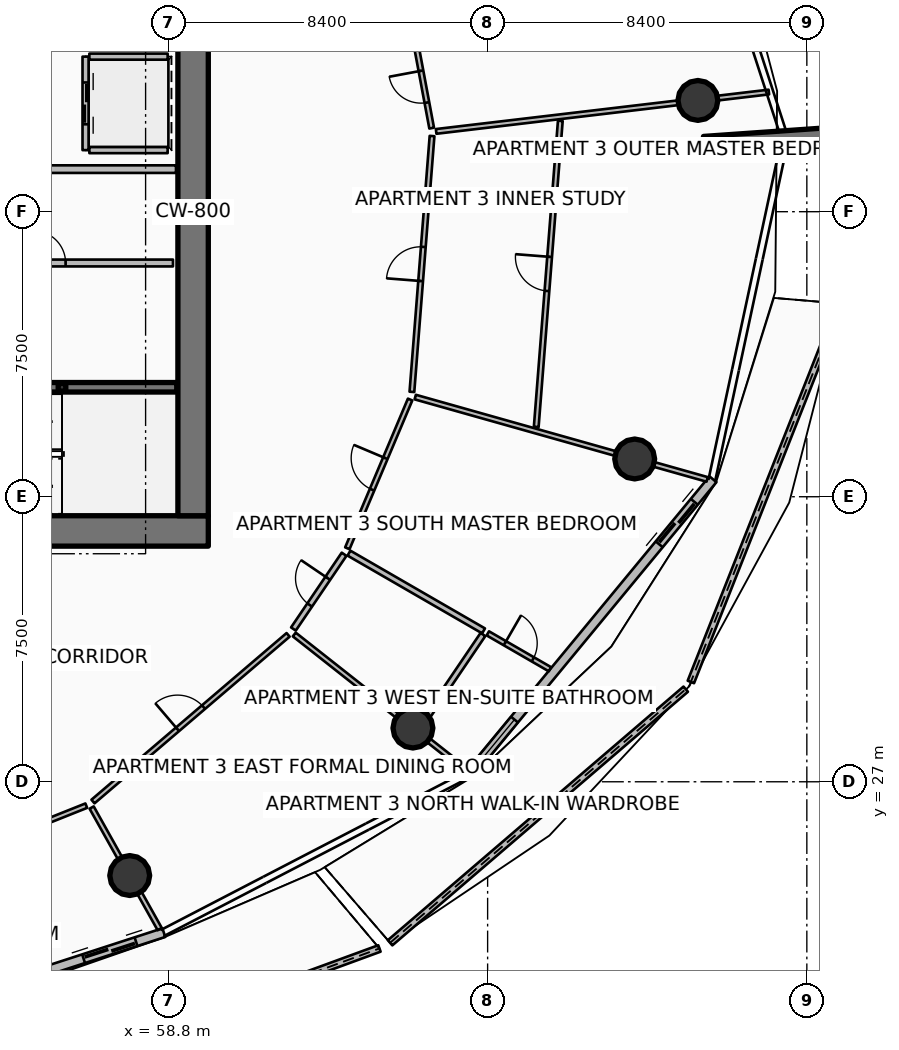
"""IFC4 building model, lengths in metres.
Left out: names, types, materials, properties, quantities, classifications, styles, units other than length and angle.
Written with IfcOpenShell. Run it as: python <this file> out.ifc"""

import sys

from ifc_helpers import new_model, si_unit, direction, frame, frame_2d, origin, origin_2d, place, context, subcontext, project, spatial, polyline, rectangle, hollow_rectangle, circle, outline, extrude, element, fill, save


model = new_model("IFC4")
c1 = context("Model", 3, precision=1e-05, world=origin(), true_north=direction((0.0, 1.0)))
c2 = subcontext(c1, "Body", "Model", "MODEL_VIEW")
j1 = project(units=[si_unit("LENGTHUNIT", "METRE"), si_unit("PLANEANGLEUNIT", "RADIAN")], contexts=[c1])
p1 = place(None, origin())
s1 = spatial("IfcSite", under=j1, at=p1, CompositionType="ELEMENT")
p2 = place(p1, origin())
s2 = spatial("IfcBuilding", under=s1, at=p2, CompositionType="ELEMENT")
p3 = place(p2, frame((0.0, 0.0, 161.55)))
s3 = spatial("IfcBuildingStorey", under=s2, at=p3, CompositionType="ELEMENT", Elevation=161.55)
p4 = place(p3, frame((49.95, 33.6, 0.0), z_axis=(0.0, 0.0, 1.0), x_axis=(1.0, 0.0, 0.0)))
e1 = element("IfcWall", 1, at=p4, inside=s3, PredefinedType="SHEAR", context=c2, shape_type="SweptSolid", body=[
    extrude(rectangle(XDim=9.9, YDim=0.8, at=frame_2d((4.95, 0.0))), origin(), (0.0, 0.0, 1.0), 3.75),
])
p5 = place(p3, frame((59.45, 34.0, 0.0), z_axis=(0.0, 0.0, 1.0), x_axis=(0.0, 1.0, 0.0)))
e2 = element("IfcWall", 2, at=p5, inside=s3, PredefinedType="SHEAR", context=c2, shape_type="SweptSolid", body=[
    extrude(rectangle(XDim=16.0, YDim=0.8, at=frame_2d((8.0, 0.0))), origin(), (0.0, 0.0, 1.0), 3.75),
])
p6 = place(p3, frame((56.0, 37.38, 0.0), z_axis=(0.0, 0.0, 1.0), x_axis=(1.0, 0.0, 0.0)))
e3 = element("IfcColumn", 3, at=p6, inside=s3, PredefinedType="COLUMN", context=c2, shape_type="SweptSolid", body=[
    extrude(hollow_rectangle(XDim=0.2, YDim=0.2, WallThickness=0.01, InnerFilletRadius=0.01, OuterFilletRadius=0.02, at=origin_2d()), origin(), (0.0, 0.0, 1.0), 1.67),
])
p7 = place(p3, frame((72.897, 43.741, 0.0), z_axis=(0.0, 0.0, 1.0), x_axis=(0.997564163539, 0.069754853754, 0.0)))
e4 = element("IfcWall", 4, at=p7, inside=s3, PredefinedType="SOLIDWALL", context=c2, shape_type="SweptSolid", body=[
    extrude(rectangle(XDim=3.5, YDim=0.48, at=frame_2d((1.75, 0.0))), origin(), (0.0, 0.0, 1.0), 3.75),
])
for number, where, z_axis, x_axis in (
    (5, (57.782, 24.533, 0.0), (0.0, 0.0, 1.0), (1.0, 0.0, 0.0)),
    (6, (65.234, 28.414, 0.0), (0.0, 0.0, 1.0), (1.0, 0.0, 0.0)),
    (7, (71.07, 35.494, 0.0), (0.0, 0.0, 1.0), (1.0, 0.0, 0.0)),
    (8, (72.733, 44.927, 0.0), (0.0, 0.0, 1.0), (1.0, 0.0, 0.0)),
):
    element("IfcColumn", number, at=place(p3, frame(where, z_axis=z_axis, x_axis=x_axis)), inside=s3, PredefinedType="COLUMN", context=c2, shape_type="SweptSolid", body=[
        extrude(circle(Radius=0.525, at=origin_2d()), origin(), (0.0, 0.0, 1.0), 3.5),
    ])
p8 = place(p3, frame((55.482, 19.362, 0.0), z_axis=(0.0, 0.0, 1.0), x_axis=(0.93889246029, 0.344210615774, 0.0)))
e9 = element("IfcWall", 9, at=p8, inside=s3, PredefinedType="PARAPET", context=c2, shape_type="SweptSolid", body=[
    extrude(outline(polyline([(0.0, 0.0), (9.449, 0.0), (9.449, 1.86), (4.725, 1.798), (0.0, 1.632), (0.0, 0.0)])), frame((0.0, 0.09, 0.0), z_axis=(0.0, -1.0, 0.0), x_axis=(1.0, 0.0, 0.0)), (0.0, 0.0, 1.0), 0.18),
])
p9 = place(p3, frame((64.634, 22.763, 0.0), z_axis=(0.0, 0.0, 1.0), x_axis=(0.758999279374, 0.651091463551, 0.0)))
e10 = element("IfcWall", 10, at=p9, inside=s3, PredefinedType="PARAPET", context=c2, shape_type="SweptSolid", body=[
    extrude(outline(polyline([(0.0, 0.0), (10.249, 0.0), (10.249, 1.632), (5.125, 1.798), (0.0, 1.86), (0.0, 0.0)])), frame((0.0, 0.09, 0.0), z_axis=(0.0, -1.0, 0.0), x_axis=(1.0, 0.0, 0.0)), (0.0, 0.0, 1.0), 0.18),
])
p10 = place(p3, frame((72.548, 29.626, 0.0), z_axis=(0.0, 0.0, 1.0), x_axis=(0.367668520181, 0.929956912587, 0.0)))
e11 = element("IfcWall", 11, at=p10, inside=s3, PredefinedType="PARAPET", context=c2, shape_type="SweptSolid", body=[
    extrude(outline(polyline([(0.0, 0.0), (10.707, 0.0), (10.707, 1.233), (5.354, 1.418), (0.0, 1.632), (0.0, 0.0)])), frame((0.0, 0.09, 0.0), z_axis=(0.0, -1.0, 0.0), x_axis=(1.0, 0.0, 0.0)), (0.0, 0.0, 1.0), 0.18),
])
p11 = place(p3, frame((50.51, 20.376, 0.0), z_axis=(0.0, 0.0, 1.0), x_axis=(0.951046390632, 0.309048156224, 0.0)))
e12 = element("IfcWall", 12, at=p11, inside=s3, PredefinedType="SOLIDWALL", context=c2, shape_type="SweptSolid", body=[
    extrude(rectangle(XDim=8.59, YDim=0.24, at=frame_2d((4.295, 0.0))), origin(), (0.0, 0.0, 1.0), 2.45),
])
p12 = place(p11, frame((6.37, 0.0, 0.0)))
e13 = element("IfcOpeningElement", 13, at=p12, cuts=e12, PredefinedType="OPENING", context=c2, shape_type="SweptSolid", body=[
    extrude(rectangle(XDim=1.45, YDim=2.15, at=frame_2d((0.725, 1.075))), frame((0.0, 0.13, 0.0), z_axis=(0.0, -1.0, 0.0), x_axis=(1.0, 0.0, 0.0)), (0.0, 0.0, 1.0), 0.26),
])
p13 = place(p11, frame((0.28, 0.0, 0.65)))
e14 = element("IfcOpeningElement", 14, at=p13, cuts=e12, PredefinedType="OPENING", context=c2, shape_type="SweptSolid", body=[
    extrude(rectangle(XDim=1.6, YDim=1.5, at=frame_2d((0.8, 0.75))), frame((0.0, 0.13, 0.0), z_axis=(0.0, -1.0, 0.0), x_axis=(1.0, 0.0, 0.0)), (0.0, 0.0, 1.0), 0.26),
])
p14 = place(p3, frame((66.709, 27.187, 0.0), z_axis=(0.0, 0.0, 1.0), x_axis=(0.636771922292, 0.77105221547, 0.0)))
e15 = element("IfcWall", 15, at=p14, inside=s3, PredefinedType="SOLIDWALL", context=c2, shape_type="SweptSolid", body=[
    extrude(rectangle(XDim=10.082, YDim=0.24, at=frame_2d((5.041, 0.0))), origin(), (0.0, 0.0, 1.0), 2.45),
])
p15 = place(p14, frame((7.862, 0.0, 0.0)))
e16 = element("IfcOpeningElement", 16, at=p15, cuts=e15, PredefinedType="OPENING", context=c2, shape_type="SweptSolid", body=[
    extrude(rectangle(XDim=1.45, YDim=2.15, at=frame_2d((0.725, 1.075))), frame((0.0, 0.13, 0.0), z_axis=(0.0, -1.0, 0.0), x_axis=(1.0, 0.0, 0.0)), (0.0, 0.0, 1.0), 0.26),
])
p16 = place(p14, frame((0.28, 0.0, 0.65)))
e17 = element("IfcOpeningElement", 17, at=p16, cuts=e15, PredefinedType="OPENING", context=c2, shape_type="SweptSolid", body=[
    extrude(rectangle(XDim=1.6, YDim=1.5, at=frame_2d((0.8, 0.75))), frame((0.0, 0.13, 0.0), z_axis=(0.0, -1.0, 0.0), x_axis=(1.0, 0.0, 0.0)), (0.0, 0.0, 1.0), 0.26),
])
p17 = place(p3, frame((51.48, 37.38, 0.0), z_axis=(0.0, 0.0, 1.0), x_axis=(1.0, 0.0, 0.0)))
e18 = element("IfcWall", 18, at=p17, inside=s3, PredefinedType="SOLIDWALL", context=c2, shape_type="SweptSolid", body=[
    extrude(rectangle(XDim=7.54, YDim=0.25, at=frame_2d((3.77, 0.0))), origin(), (0.0, 0.0, 1.0), 3.5),
])
p18 = place(p17, frame((0.3, 0.0, 0.0)))
e19 = element("IfcOpeningElement", 19, at=p18, cuts=e18, PredefinedType="OPENING", context=c2, shape_type="SweptSolid", body=[
    extrude(rectangle(XDim=1.55, YDim=2.15, at=frame_2d((0.775, 1.075))), frame((0.0, 0.135, 0.0), z_axis=(0.0, -1.0, 0.0), x_axis=(1.0, 0.0, 0.0)), (0.0, 0.0, 1.0), 0.27),
])
p19 = place(p3, frame((56.62, 46.08, 0.0), z_axis=(0.0, 0.0, 1.0), x_axis=(0.0, -1.0, 0.0)))
e20 = element("IfcWall", 20, at=p19, inside=s3, PredefinedType="PARTITIONING", context=c2, shape_type="SweptSolid", body=[
    extrude(rectangle(XDim=2.46, YDim=0.16, at=frame_2d((1.23, 0.0))), origin(), (0.0, 0.0, 1.0), 3.5),
])
p20 = place(p19, frame((0.68, 0.0, 0.0)))
e21 = element("IfcOpeningElement", 21, at=p20, cuts=e20, PredefinedType="OPENING", context=c2, shape_type="SweptSolid", body=[
    extrude(rectangle(XDim=1.1, YDim=2.1, at=frame_2d((0.55, 1.05))), frame((0.0, 0.09, 0.0), z_axis=(0.0, -1.0, 0.0), x_axis=(1.0, 0.0, 0.0)), (0.0, 0.0, 1.0), 0.18),
])
for number, where, z_axis, x_axis in (
    (22, (56.72, 46.08, 0.0), (0.0, 0.0, 1.0), (1.0, 0.0, 0.0)),
    (23, (56.72, 43.62, 0.0), (0.0, 0.0, 1.0), (1.0, 0.0, 0.0)),
):
    element("IfcWall", number, at=place(p3, frame(where, z_axis=z_axis, x_axis=x_axis)), inside=s3, PredefinedType="PARTITIONING", context=c2, shape_type="SweptSolid", body=[
        extrude(rectangle(XDim=2.06, YDim=0.16, at=frame_2d((1.03, 0.0))), origin(), (0.0, 0.0, 1.0), 3.5),
    ])
p21 = place(p3, frame((52.42, 40.65, 0.0), z_axis=(0.0, 0.0, 1.0), x_axis=(1.0, 0.0, 0.0)))
e24 = element("IfcWall", 24, at=p21, inside=s3, PredefinedType="PARTITIONING", context=c2, shape_type="SweptSolid", body=[
    extrude(rectangle(XDim=6.5, YDim=0.18, at=frame_2d((3.25, 0.0))), origin(), (0.0, 0.0, 1.0), 3.5),
])
p22 = place(p21, frame((2.825, 0.0, 0.0)))
e25 = element("IfcOpeningElement", 25, at=p22, cuts=e24, PredefinedType="OPENING", context=c2, shape_type="SweptSolid", body=[
    extrude(rectangle(XDim=0.85, YDim=2.06, at=frame_2d((0.425, 1.03))), frame((0.0, 0.1, 0.0), z_axis=(0.0, -1.0, 0.0), x_axis=(1.0, 0.0, 0.0)), (0.0, 0.0, 1.0), 0.2),
])
p23 = place(p3, frame((50.12, 43.12, 0.0), z_axis=(0.0, 0.0, 1.0), x_axis=(1.0, 0.0, 0.0)))
e26 = element("IfcWall", 26, at=p23, inside=s3, PredefinedType="PARTITIONING", context=c2, shape_type="SweptSolid", body=[
    extrude(rectangle(XDim=8.88, YDim=0.2, at=frame_2d((4.44, 0.0))), origin(), (0.0, 0.0, 1.0), 3.5),
])
p24 = place(p3, frame((52.494, 24.716, 0.0), z_axis=(0.0, 0.0, 1.0), x_axis=(0.928695316587, 0.370843644882, 0.0)))
e27 = element("IfcWall", 27, at=p24, inside=s3, PredefinedType="PARTITIONING", context=c2, shape_type="SweptSolid", body=[
    extrude(rectangle(XDim=4.464, YDim=0.125, at=frame_2d((2.232, 0.0))), origin(), (0.0, 0.0, 1.0), 2.94),
])
p25 = place(p24, frame((1.782, 0.0, 0.0)))
e28 = element("IfcOpeningElement", 28, at=p25, cuts=e27, PredefinedType="OPENING", context=c2, shape_type="SweptSolid", body=[
    extrude(rectangle(XDim=0.9, YDim=2.08, at=frame_2d((0.45, 1.04))), frame((0.0, 0.073, 0.0), z_axis=(0.0, -1.0, 0.0), x_axis=(1.0, 0.0, 0.0)), (0.0, 0.0, 1.0), 0.145),
])
p26 = place(p3, frame((56.781, 26.321, 0.0), z_axis=(0.0, 0.0, 1.0), x_axis=(0.488615541235, -0.872499199348, 0.0)))
e29 = element("IfcWall", 29, at=p26, inside=s3, PredefinedType="PARTITIONING", context=c2, shape_type="SweptSolid", body=[
    extrude(rectangle(XDim=3.665, YDim=0.125, at=frame_2d((1.832, 0.0))), origin(), (0.0, 0.0, 1.0), 2.94),
])
p27 = place(p3, frame((56.815, 26.48, 0.0), z_axis=(0.0, 0.0, 1.0), x_axis=(0.760406411553, 0.649447526186, 0.0)))
e30 = element("IfcWall", 30, at=p27, inside=s3, PredefinedType="PARTITIONING", context=c2, shape_type="SweptSolid", body=[
    extrude(rectangle(XDim=6.753, YDim=0.125, at=frame_2d((3.376, 0.0))), origin(), (0.0, 0.0, 1.0), 2.94),
])
p28 = place(p27, frame((2.926, 0.0, 0.0)))
e31 = element("IfcOpeningElement", 31, at=p28, cuts=e30, PredefinedType="OPENING", context=c2, shape_type="SweptSolid", body=[
    extrude(rectangle(XDim=0.9, YDim=2.08, at=frame_2d((0.45, 1.04))), frame((0.0, 0.073, 0.0), z_axis=(0.0, -1.0, 0.0), x_axis=(1.0, 0.0, 0.0)), (0.0, 0.0, 1.0), 0.145),
])
p29 = place(p3, frame((62.112, 30.875, 0.0), z_axis=(0.0, 0.0, 1.0), x_axis=(0.785328664081, -0.619079065526, 0.0)))
e32 = element("IfcWall", 32, at=p29, inside=s3, PredefinedType="PARTITIONING", context=c2, shape_type="SweptSolid", body=[
    extrude(rectangle(XDim=5.87, YDim=0.125, at=frame_2d((2.935, 0.0))), origin(), (0.0, 0.0, 1.0), 2.94),
])
p30 = place(p3, frame((62.09, 31.02, 0.0), z_axis=(0.0, 0.0, 1.0), x_axis=(0.561179778306, 0.827693938857, 0.0)))
e33 = element("IfcWall", 33, at=p30, inside=s3, PredefinedType="PARTITIONING", context=c2, shape_type="SweptSolid", body=[
    extrude(rectangle(XDim=2.376, YDim=0.15, at=frame_2d((1.188, 0.0))), origin(), (0.0, 0.0, 1.0), 2.94),
])
p31 = place(p30, frame((0.763, 0.0, 0.0)))
e34 = element("IfcOpeningElement", 34, at=p31, cuts=e33, PredefinedType="OPENING", context=c2, shape_type="SweptSolid", body=[
    extrude(rectangle(XDim=0.85, YDim=2.06, at=frame_2d((0.425, 1.03))), frame((0.0, 0.085, 0.0), z_axis=(0.0, -1.0, 0.0), x_axis=(1.0, 0.0, 0.0)), (0.0, 0.0, 1.0), 0.17),
])
p32 = place(p3, frame((65.404, 28.407, 0.0), z_axis=(0.0, 0.0, 1.0), x_axis=(0.561106969612, 0.827743298767, 0.0)))
e35 = element("IfcWall", 35, at=p32, inside=s3, PredefinedType="PARTITIONING", context=c2, shape_type="SweptSolid", body=[
    extrude(rectangle(XDim=2.982, YDim=0.15, at=frame_2d((1.491, 0.0))), origin(), (0.0, 0.0, 1.0), 2.94),
])
p33 = place(p3, frame((63.552, 33.016, 0.0), z_axis=(0.0, 0.0, 1.0), x_axis=(0.865897249189, -0.500221904605, 0.0)))
e36 = element("IfcWall", 36, at=p33, inside=s3, PredefinedType="PARTITIONING", context=c2, shape_type="SweptSolid", body=[
    extrude(rectangle(XDim=4.09, YDim=0.15, at=frame_2d((2.045, 0.0))), origin(), (0.0, 0.0, 1.0), 2.94),
])
p34 = place(p3, frame((67.206, 30.905, 0.0), z_axis=(0.0, 0.0, 1.0), x_axis=(0.865877522555, -0.500256050372, 0.0)))
e37 = element("IfcWall", 37, at=p34, inside=s3, PredefinedType="PARTITIONING", context=c2, shape_type="SweptSolid", body=[
    extrude(rectangle(XDim=1.888, YDim=0.125, at=frame_2d((0.944, 0.0))), origin(), (0.0, 0.0, 1.0), 2.94),
])
p35 = place(p34, frame((0.519, 0.0, 0.0)))
e38 = element("IfcOpeningElement", 38, at=p35, cuts=e37, PredefinedType="OPENING", context=c2, shape_type="SweptSolid", body=[
    extrude(rectangle(XDim=0.85, YDim=2.06, at=frame_2d((0.425, 1.03))), frame((0.0, 0.073, 0.0), z_axis=(0.0, -1.0, 0.0), x_axis=(1.0, 0.0, 0.0)), (0.0, 0.0, 1.0), 0.145),
])
p36 = place(p3, frame((63.509, 33.144, 0.0), z_axis=(0.0, 0.0, 1.0), x_axis=(0.38881485578, 0.921315911034, 0.0)))
e39 = element("IfcWall", 39, at=p36, inside=s3, PredefinedType="PARTITIONING", context=c2, shape_type="SweptSolid", body=[
    extrude(rectangle(XDim=4.248, YDim=0.125, at=frame_2d((2.124, 0.0))), origin(), (0.0, 0.0, 1.0), 2.94),
])
p37 = place(p36, frame((1.674, 0.0, 0.0)))
e40 = element("IfcOpeningElement", 40, at=p37, cuts=e39, PredefinedType="OPENING", context=c2, shape_type="SweptSolid", body=[
    extrude(rectangle(XDim=0.9, YDim=2.08, at=frame_2d((0.45, 1.04))), frame((0.0, 0.073, 0.0), z_axis=(0.0, -1.0, 0.0), x_axis=(1.0, 0.0, 0.0)), (0.0, 0.0, 1.0), 0.145),
])
p38 = place(p3, frame((65.295, 37.122, 0.0), z_axis=(0.0, 0.0, 1.0), x_axis=(0.962453364466, -0.271447087346, 0.0)))
e41 = element("IfcWall", 41, at=p38, inside=s3, PredefinedType="PARTITIONING", context=c2, shape_type="SweptSolid", body=[
    extrude(rectangle(XDim=7.981, YDim=0.125, at=frame_2d((3.991, 0.0))), origin(), (0.0, 0.0, 1.0), 2.94),
])
p39 = place(p3, frame((65.208, 37.259, 0.0), z_axis=(0.0, 0.0, 1.0), x_axis=(0.078457580711, 0.996917452966, 0.0)))
e42 = element("IfcWall", 42, at=p39, inside=s3, PredefinedType="PARTITIONING", context=c2, shape_type="SweptSolid", body=[
    extrude(rectangle(XDim=6.752, YDim=0.125, at=frame_2d((3.376, 0.0))), origin(), (0.0, 0.0, 1.0), 2.94),
])
p40 = place(p39, frame((2.926, 0.0, 0.0)))
e43 = element("IfcOpeningElement", 43, at=p40, cuts=e42, PredefinedType="OPENING", context=c2, shape_type="SweptSolid", body=[
    extrude(rectangle(XDim=0.9, YDim=2.08, at=frame_2d((0.45, 1.04))), frame((0.0, 0.073, 0.0), z_axis=(0.0, -1.0, 0.0), x_axis=(1.0, 0.0, 0.0)), (0.0, 0.0, 1.0), 0.145),
])
p41 = place(p3, frame((68.479, 36.336, 0.0), z_axis=(0.0, 0.0, 1.0), x_axis=(0.078482765766, 0.996915470578, 0.0)))
e44 = element("IfcWall", 44, at=p41, inside=s3, PredefinedType="PARTITIONING", context=c2, shape_type="SweptSolid", body=[
    extrude(rectangle(XDim=8.079, YDim=0.125, at=frame_2d((4.039, 0.0))), origin(), (0.0, 0.0, 1.0), 2.94),
])
p42 = place(p41, frame((3.589, 0.0, 0.0)))
e45 = element("IfcOpeningElement", 45, at=p42, cuts=e44, PredefinedType="OPENING", context=c2, shape_type="SweptSolid", body=[
    extrude(rectangle(XDim=0.9, YDim=2.08, at=frame_2d((0.45, 1.04))), frame((0.0, 0.073, 0.0), z_axis=(0.0, -1.0, 0.0), x_axis=(1.0, 0.0, 0.0)), (0.0, 0.0, 1.0), 0.145),
])
p43 = place(p3, frame((65.845, 44.112, 0.0), z_axis=(0.0, 0.0, 1.0), x_axis=(0.993069843717, 0.117525680174, 0.0)))
e46 = element("IfcWall", 46, at=p43, inside=s3, PredefinedType="PARTITIONING", context=c2, shape_type="SweptSolid", body=[
    extrude(rectangle(XDim=8.816, YDim=0.125, at=frame_2d((4.408, 0.0))), origin(), (0.0, 0.0, 1.0), 2.94),
])
p44 = place(p3, frame((65.728, 44.199, 0.0), z_axis=(0.0, 0.0, 1.0), x_axis=(-0.183909749888, 0.982943133602, 0.0)))
e47 = element("IfcWall", 47, at=p44, inside=s3, PredefinedType="PARTITIONING", context=c2, shape_type="SweptSolid", body=[
    extrude(rectangle(XDim=2.218, YDim=0.125, at=frame_2d((1.109, 0.0))), origin(), (0.0, 0.0, 1.0), 2.94),
])
p45 = place(p44, frame((0.684, 0.0, 0.0)))
e48 = element("IfcOpeningElement", 48, at=p45, cuts=e47, PredefinedType="OPENING", context=c2, shape_type="SweptSolid", body=[
    extrude(rectangle(XDim=0.85, YDim=2.06, at=frame_2d((0.425, 1.03))), frame((0.0, 0.073, 0.0), z_axis=(0.0, -1.0, 0.0), x_axis=(1.0, 0.0, 0.0)), (0.0, 0.0, 1.0), 0.145),
])
p46 = place(p12, origin())
e49 = element("IfcDoor", 49, at=p46, inside=s3, OperationType="DOUBLE_DOOR_SLIDING", PredefinedType="DOOR", context=c2, shape_type="SweptSolid", body=[
    extrude(rectangle(XDim=1.45, YDim=2.15, at=frame_2d((0.725, 1.075))), frame((0.0, 0.025, 0.0), z_axis=(0.0, -1.0, 0.0), x_axis=(1.0, 0.0, 0.0)), (0.0, 0.0, 1.0), 0.05),
])
fill(e13, e49)
p47 = place(p15, origin())
e50 = element("IfcDoor", 50, at=p47, inside=s3, OperationType="DOUBLE_DOOR_SLIDING", PredefinedType="DOOR", context=c2, shape_type="SweptSolid", body=[
    extrude(rectangle(XDim=1.45, YDim=2.15, at=frame_2d((0.725, 1.075))), frame((0.0, 0.025, 0.0), z_axis=(0.0, -1.0, 0.0), x_axis=(1.0, 0.0, 0.0)), (0.0, 0.0, 1.0), 0.05),
])
fill(e16, e50)
p48 = place(p16, origin())
e51 = element("IfcWindow", 51, at=p48, inside=s3, PartitioningType="SINGLE_PANEL", PredefinedType="WINDOW", context=c2, shape_type="SweptSolid", body=[
    extrude(rectangle(XDim=1.6, YDim=1.5, at=frame_2d((0.8, 0.75))), frame((0.0, 0.03, 0.0), z_axis=(0.0, -1.0, 0.0), x_axis=(1.0, 0.0, 0.0)), (0.0, 0.0, 1.0), 0.06),
])
fill(e17, e51)
p49 = place(p20, origin())
e52 = element("IfcDoor", 52, at=p49, inside=s3, OperationType="DOUBLE_DOOR_SLIDING", PredefinedType="DOOR", context=c2, shape_type="SweptSolid", body=[
    extrude(rectangle(XDim=1.1, YDim=2.1, at=frame_2d((0.55, 1.05))), frame((0.0, 0.025, 0.0), z_axis=(0.0, -1.0, 0.0), x_axis=(1.0, 0.0, 0.0)), (0.0, 0.0, 1.0), 0.05),
])
fill(e21, e52)
p50 = place(p22, origin())
e53 = element("IfcDoor", 53, at=p50, inside=s3, OperationType="SINGLE_SWING_LEFT", PredefinedType="DOOR", context=c2, shape_type="SweptSolid", body=[
    extrude(rectangle(XDim=0.85, YDim=2.06, at=frame_2d((0.425, 1.03))), frame((0.0, 0.025, 0.0), z_axis=(0.0, -1.0, 0.0), x_axis=(1.0, 0.0, 0.0)), (0.0, 0.0, 1.0), 0.05),
])
fill(e25, e53)
p51 = place(p28, origin())
e54 = element("IfcDoor", 54, at=p51, inside=s3, OperationType="SINGLE_SWING_LEFT", PredefinedType="DOOR", context=c2, shape_type="SweptSolid", body=[
    extrude(rectangle(XDim=0.9, YDim=2.08, at=frame_2d((0.45, 1.04))), frame((0.0, 0.025, 0.0), z_axis=(0.0, -1.0, 0.0), x_axis=(1.0, 0.0, 0.0)), (0.0, 0.0, 1.0), 0.05),
])
fill(e31, e54)
p52 = place(p31, origin())
e55 = element("IfcDoor", 55, at=p52, inside=s3, OperationType="SINGLE_SWING_RIGHT", PredefinedType="DOOR", context=c2, shape_type="SweptSolid", body=[
    extrude(rectangle(XDim=0.85, YDim=2.06, at=frame_2d((0.425, 1.03))), frame((0.0, 0.025, 0.0), z_axis=(0.0, -1.0, 0.0), x_axis=(1.0, 0.0, 0.0)), (0.0, 0.0, 1.0), 0.05),
])
fill(e34, e55)
p53 = place(p35, origin())
e56 = element("IfcDoor", 56, at=p53, inside=s3, OperationType="SINGLE_SWING_LEFT", PredefinedType="DOOR", context=c2, shape_type="SweptSolid", body=[
    extrude(rectangle(XDim=0.85, YDim=2.06, at=frame_2d((0.425, 1.03))), frame((0.0, 0.025, 0.0), z_axis=(0.0, -1.0, 0.0), x_axis=(1.0, 0.0, 0.0)), (0.0, 0.0, 1.0), 0.05),
])
fill(e38, e56)
p54 = place(p37, origin())
e57 = element("IfcDoor", 57, at=p54, inside=s3, OperationType="SINGLE_SWING_RIGHT", PredefinedType="DOOR", context=c2, shape_type="SweptSolid", body=[
    extrude(rectangle(XDim=0.9, YDim=2.08, at=frame_2d((0.45, 1.04))), frame((0.0, 0.025, 0.0), z_axis=(0.0, -1.0, 0.0), x_axis=(1.0, 0.0, 0.0)), (0.0, 0.0, 1.0), 0.05),
])
fill(e40, e57)
p55 = place(p40, origin())
e58 = element("IfcDoor", 58, at=p55, inside=s3, OperationType="SINGLE_SWING_LEFT", PredefinedType="DOOR", context=c2, shape_type="SweptSolid", body=[
    extrude(rectangle(XDim=0.9, YDim=2.08, at=frame_2d((0.45, 1.04))), frame((0.0, 0.025, 0.0), z_axis=(0.0, -1.0, 0.0), x_axis=(1.0, 0.0, 0.0)), (0.0, 0.0, 1.0), 0.05),
])
fill(e43, e58)
p56 = place(p42, origin())
e59 = element("IfcDoor", 59, at=p56, inside=s3, OperationType="SINGLE_SWING_RIGHT", PredefinedType="DOOR", context=c2, shape_type="SweptSolid", body=[
    extrude(rectangle(XDim=0.9, YDim=2.08, at=frame_2d((0.45, 1.04))), frame((0.0, 0.025, 0.0), z_axis=(0.0, -1.0, 0.0), x_axis=(1.0, 0.0, 0.0)), (0.0, 0.0, 1.0), 0.05),
])
fill(e45, e59)
p57 = place(p45, origin())
e60 = element("IfcDoor", 60, at=p57, inside=s3, OperationType="SINGLE_SWING_RIGHT", PredefinedType="DOOR", context=c2, shape_type="SweptSolid", body=[
    extrude(rectangle(XDim=0.85, YDim=2.06, at=frame_2d((0.425, 1.03))), frame((0.0, 0.025, 0.0), z_axis=(0.0, -1.0, 0.0), x_axis=(1.0, 0.0, 0.0)), (0.0, 0.0, 1.0), 0.05),
])
fill(e48, e60)
save(model, sys.argv[1])
